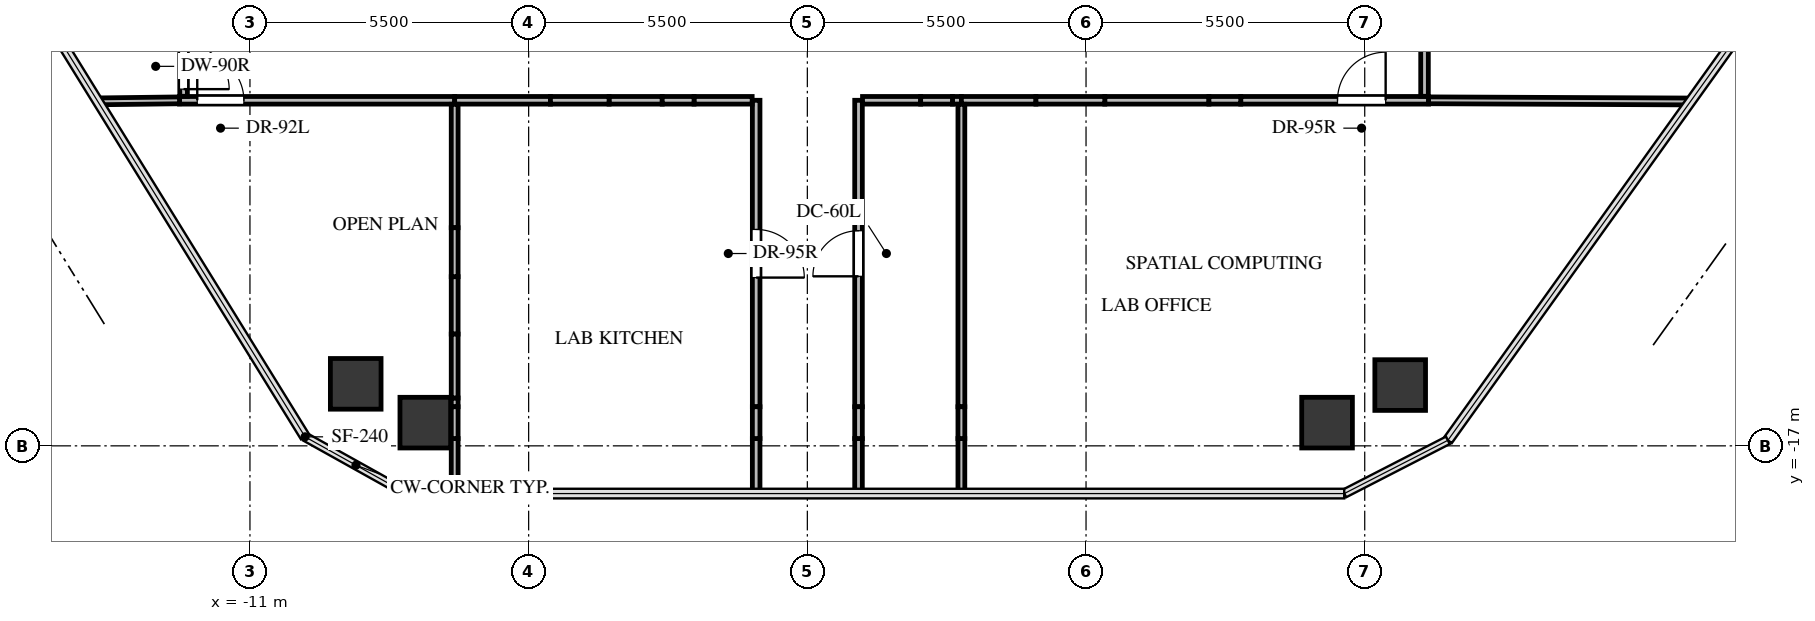
"""IFC4 building model, lengths in metres.
Left out: names, types, materials, properties, quantities, classifications, styles, units other than length and angle.
Written with IfcOpenShell. Run it as: python <this file> out.ifc"""

import sys

from ifc_helpers import new_model, si_unit, direction, frame, frame_2d, origin, origin_2d, place, context, subcontext, project, spatial, rectangle, extrude, source, transform, mapped, element, fill, save


model = new_model("IFC4")
c1 = context("Model", 3, precision=1e-05, world=origin(), true_north=direction((0.0, 1.0)))
c2 = subcontext(c1, "Body", "Model", "MODEL_VIEW")
j1 = project(units=[si_unit("LENGTHUNIT", "METRE"), si_unit("PLANEANGLEUNIT", "RADIAN")], contexts=[c1])
p1 = place(None, origin())
s1 = spatial("IfcSite", under=j1, at=p1, CompositionType="ELEMENT")
p2 = place(p1, origin())
s2 = spatial("IfcBuilding", under=s1, at=p2, CompositionType="ELEMENT")
p3 = place(p2, frame((0.0, 0.0, 159.3)))
s3 = spatial("IfcBuildingStorey", under=s2, at=p3, CompositionType="ELEMENT", Elevation=159.3)
m1 = source(origin(), c2, "Body", "SweptSolid", [
    extrude(rectangle(XDim=1.0, YDim=1.0, at=origin_2d()), origin(), (0.0, 0.0, 1.0), 3.22),
])
for number, where, z_axis, x_axis in (
    (1, (-8.913, -15.776, -0.24), (0.0, 0.0, 1.0), (1.0, 0.0, 0.0)),
    (2, (11.7, -15.8, -0.24), (0.0, 0.0, 1.0), (1.0, 0.0, 0.0)),
    (3, (10.257, -16.542, -0.24), (0.0, 0.0, 1.0), (1.0, 0.0, 0.0)),
    (4, (-7.54, -16.542, -0.24), (0.0, 0.0, 1.0), (1.0, 0.0, 0.0)),
):
    element("IfcColumn", number, at=place(p3, frame(where, z_axis=z_axis, x_axis=x_axis)), inside=s3, PredefinedType="COLUMN", context=c2, shape_type="MappedRepresentation", body=[
        mapped(m1, transform((0.0, 0.0, 0.0), x_axis=(1.0, 0.0, 0.0), y_axis=(0.0, 1.0, 0.0), z_axis=(0.0, 0.0, 1.0), scale=1.0)),
    ])
p4 = place(p3, frame((-12.39, -10.18, 0.0), z_axis=(0.0, 0.0, 1.0), x_axis=(1.0, 0.0, 0.0)))
e5 = element("IfcWall", 5, at=p4, inside=s3, PredefinedType="PARTITIONING", context=c2, shape_type="SweptSolid", body=[
    extrude(rectangle(XDim=5.43, YDim=0.15, at=frame_2d((2.715, 0.0))), origin(), (0.0, 0.0, 1.0), 2.319),
])
p5 = place(p4, frame((0.35, 0.0, 0.0)))
e6 = element("IfcOpeningElement", 6, at=p5, cuts=e5, PredefinedType="OPENING", context=c2, shape_type="SweptSolid", body=[
    extrude(rectangle(XDim=0.92, YDim=2.1, at=frame_2d((0.46, 1.05))), frame((0.0, 0.085, 0.0), z_axis=(0.0, -1.0, 0.0), x_axis=(1.0, 0.0, 0.0)), (0.0, 0.0, 1.0), 0.17),
])
p6 = place(p3, frame((-1.01, -10.18, 0.0), z_axis=(0.0, 0.0, 1.0), x_axis=(0.0, -1.0, 0.0)))
e7 = element("IfcWall", 7, at=p6, inside=s3, PredefinedType="PARTITIONING", context=c2, shape_type="SweptSolid", body=[
    extrude(rectangle(XDim=6.048, YDim=0.15, at=frame_2d((3.024, 0.0))), origin(), (0.0, 0.0, 1.0), 2.965),
])
p7 = place(p6, frame((2.549, 0.0, 0.0)))
e8 = element("IfcOpeningElement", 8, at=p7, cuts=e7, PredefinedType="OPENING", context=c2, shape_type="SweptSolid", body=[
    extrude(rectangle(XDim=0.95, YDim=2.1, at=frame_2d((0.475, 1.05))), frame((0.0, 0.085, 0.0), z_axis=(0.0, -1.0, 0.0), x_axis=(1.0, 0.0, 0.0)), (0.0, 0.0, 1.0), 0.17),
])
p8 = place(p3, frame((-1.01, -16.856, 0.0), z_axis=(0.0, 0.0, 1.0), x_axis=(0.0, -1.0, 0.0)))
e9 = element("IfcWall", 9, at=p8, inside=s3, PredefinedType="PARTITIONING", context=c2, shape_type="SweptSolid", body=[
    extrude(rectangle(XDim=1.086, YDim=0.15, at=frame_2d((0.543, 0.0))), origin(), (0.0, 0.0, 1.0), 2.965),
])
p9 = place(p3, frame((-1.01, -16.228, 0.0), z_axis=(0.0, 0.0, 1.0), x_axis=(0.0, -1.0, 0.0)))
e10 = element("IfcWall", 10, at=p9, inside=s3, PredefinedType="PARTITIONING", context=c2, shape_type="SweptSolid", body=[
    extrude(rectangle(XDim=0.627, YDim=0.15, at=frame_2d((0.314, 0.0))), origin(), (0.0, 0.0, 1.0), 1.904),
])
p10 = place(p3, frame((-6.96, -10.18, 0.0), z_axis=(0.0, 0.0, 1.0), x_axis=(1.0, 0.0, 0.0)))
e11 = element("IfcWall", 11, at=p10, inside=s3, PredefinedType="PARTITIONING", context=c2, shape_type="SweptSolid", body=[
    extrude(rectangle(XDim=1.89, YDim=0.15, at=frame_2d((0.945, 0.0))), origin(), (0.0, 0.0, 1.0), 2.965),
])
p11 = place(p3, frame((-3.913, -10.18, 0.0), z_axis=(0.0, 0.0, 1.0), x_axis=(1.0, 0.0, 0.0)))
e12 = element("IfcWall", 12, at=p11, inside=s3, PredefinedType="PARTITIONING", context=c2, shape_type="SweptSolid", body=[
    extrude(rectangle(XDim=1.049, YDim=0.15, at=frame_2d((0.524, 0.0))), origin(), (0.0, 0.0, 1.0), 2.965),
])
p12 = place(p3, frame((-2.236, -10.18, 0.0), z_axis=(0.0, 0.0, 1.0), x_axis=(1.0, 0.0, 0.0)))
e13 = element("IfcWall", 13, at=p12, inside=s3, PredefinedType="PARTITIONING", context=c2, shape_type="SweptSolid", body=[
    extrude(rectangle(XDim=1.147, YDim=0.15, at=frame_2d((0.573, 0.0))), origin(), (0.0, 0.0, 1.0), 2.965),
])
p13 = place(p3, frame((-5.07, -10.18, 0.0), z_axis=(0.0, 0.0, 1.0), x_axis=(1.0, 0.0, 0.0)))
e14 = element("IfcWall", 14, at=p13, inside=s3, PredefinedType="PARTITIONING", context=c2, shape_type="SweptSolid", body=[
    extrude(rectangle(XDim=1.157, YDim=0.15, at=frame_2d((0.579, 0.0))), origin(), (0.0, 0.0, 1.0), 1.904),
])
p14 = place(p3, frame((-2.864, -10.18, 0.0), z_axis=(0.0, 0.0, 1.0), x_axis=(1.0, 0.0, 0.0)))
e15 = element("IfcWall", 15, at=p14, inside=s3, PredefinedType="PARTITIONING", context=c2, shape_type="SweptSolid", body=[
    extrude(rectangle(XDim=0.628, YDim=0.15, at=frame_2d((0.314, 0.0))), origin(), (0.0, 0.0, 1.0), 1.904),
])
p15 = place(p3, frame((1.01, -17.942, 0.0), z_axis=(0.0, 0.0, 1.0), x_axis=(0.0, 1.0, 0.0)))
e16 = element("IfcWall", 16, at=p15, inside=s3, PredefinedType="PARTITIONING", context=c2, shape_type="SweptSolid", body=[
    extrude(rectangle(XDim=1.086, YDim=0.15, at=frame_2d((0.543, 0.0))), origin(), (0.0, 0.0, 1.0), 2.965),
])
p16 = place(p3, frame((1.01, -16.228, 0.0), z_axis=(0.0, 0.0, 1.0), x_axis=(0.0, 1.0, 0.0)))
e17 = element("IfcWall", 17, at=p16, inside=s3, PredefinedType="PARTITIONING", context=c2, shape_type="SweptSolid", body=[
    extrude(rectangle(XDim=6.048, YDim=0.15, at=frame_2d((3.024, 0.0))), origin(), (0.0, 0.0, 1.0), 2.965),
])
p17 = place(p16, frame((2.574, 0.0, 0.0)))
e18 = element("IfcOpeningElement", 18, at=p17, cuts=e17, PredefinedType="OPENING", context=c2, shape_type="SweptSolid", body=[
    extrude(rectangle(XDim=0.9, YDim=2.05, at=frame_2d((0.45, 1.025))), frame((0.0, 0.085, 0.0), z_axis=(0.0, -1.0, 0.0), x_axis=(1.0, 0.0, 0.0)), (0.0, 0.0, 1.0), 0.17),
])
p18 = place(p3, frame((1.01, -16.856, 0.0), z_axis=(0.0, 0.0, 1.0), x_axis=(0.0, 1.0, 0.0)))
e19 = element("IfcWall", 19, at=p18, inside=s3, PredefinedType="PARTITIONING", context=c2, shape_type="SweptSolid", body=[
    extrude(rectangle(XDim=0.627, YDim=0.15, at=frame_2d((0.314, 0.0))), origin(), (0.0, 0.0, 1.0), 1.904),
])
p19 = place(p3, frame((1.089, -10.18, 0.0), z_axis=(0.0, 0.0, 1.0), x_axis=(1.0, 0.0, 0.0)))
e20 = element("IfcWall", 20, at=p19, inside=s3, PredefinedType="PARTITIONING", context=c2, shape_type="SweptSolid", body=[
    extrude(rectangle(XDim=1.147, YDim=0.15, at=frame_2d((0.573, 0.0))), origin(), (0.0, 0.0, 1.0), 2.965),
])
p20 = place(p3, frame((2.864, -10.18, 0.0), z_axis=(0.0, 0.0, 1.0), x_axis=(1.0, 0.0, 0.0)))
e21 = element("IfcWall", 21, at=p20, inside=s3, PredefinedType="PARTITIONING", context=c2, shape_type="SweptSolid", body=[
    extrude(rectangle(XDim=0.176, YDim=0.15, at=frame_2d((0.088, 0.0))), origin(), (0.0, 0.0, 1.0), 2.965),
])
p21 = place(p3, frame((2.236, -10.18, 0.0), z_axis=(0.0, 0.0, 1.0), x_axis=(1.0, 0.0, 0.0)))
e22 = element("IfcWall", 22, at=p21, inside=s3, PredefinedType="PARTITIONING", context=c2, shape_type="SweptSolid", body=[
    extrude(rectangle(XDim=0.628, YDim=0.15, at=frame_2d((0.314, 0.0))), origin(), (0.0, 0.0, 1.0), 1.904),
])
p22 = place(p3, frame((3.04, -10.18, 0.0), z_axis=(0.0, 0.0, 1.0), x_axis=(1.0, 0.0, 0.0)))
e23 = element("IfcWall", 23, at=p22, inside=s3, PredefinedType="PARTITIONING", context=c2, shape_type="SweptSolid", body=[
    extrude(rectangle(XDim=1.471, YDim=0.15, at=frame_2d((0.736, 0.0))), origin(), (0.0, 0.0, 1.0), 2.162),
])
p23 = place(p3, frame((5.87, -10.18, 0.0), z_axis=(0.0, 0.0, 1.0), x_axis=(1.0, 0.0, 0.0)))
e24 = element("IfcWall", 24, at=p23, inside=s3, PredefinedType="PARTITIONING", context=c2, shape_type="SweptSolid", body=[
    extrude(rectangle(XDim=2.056, YDim=0.15, at=frame_2d((1.028, 0.0))), origin(), (0.0, 0.0, 1.0), 2.162),
])
p24 = place(p3, frame((8.553, -10.18, 0.0), z_axis=(0.0, 0.0, 1.0), x_axis=(1.0, 0.0, 0.0)))
e25 = element("IfcWall", 25, at=p24, inside=s3, PredefinedType="PARTITIONING", context=c2, shape_type="SweptSolid", body=[
    extrude(rectangle(XDim=3.707, YDim=0.15, at=frame_2d((1.854, 0.0))), origin(), (0.0, 0.0, 1.0), 2.965),
])
p25 = place(p24, frame((1.91, 0.0, 0.0)))
e26 = element("IfcOpeningElement", 26, at=p25, cuts=e25, PredefinedType="OPENING", context=c2, shape_type="SweptSolid", body=[
    extrude(rectangle(XDim=0.95, YDim=2.1, at=frame_2d((0.475, 1.05))), frame((0.0, 0.085, 0.0), z_axis=(0.0, -1.0, 0.0), x_axis=(1.0, 0.0, 0.0)), (0.0, 0.0, 1.0), 0.17),
])
p26 = place(p3, frame((4.511, -10.18, 0.0), z_axis=(0.0, 0.0, 1.0), x_axis=(1.0, 0.0, 0.0)))
e27 = element("IfcWall", 27, at=p26, inside=s3, PredefinedType="PARTITIONING", context=c2, shape_type="SweptSolid", body=[
    extrude(rectangle(XDim=1.358, YDim=0.15, at=frame_2d((0.679, 0.0))), origin(), (0.0, 0.0, 1.0), 2.162),
])
p27 = place(p3, frame((7.925, -10.18, 0.0), z_axis=(0.0, 0.0, 1.0), x_axis=(1.0, 0.0, 0.0)))
e28 = element("IfcWall", 28, at=p27, inside=s3, PredefinedType="PARTITIONING", context=c2, shape_type="SweptSolid", body=[
    extrude(rectangle(XDim=0.627, YDim=0.15, at=frame_2d((0.314, 0.0))), origin(), (0.0, 0.0, 1.0), 1.904),
])
p28 = place(p3, frame((-12.31, -8.919, 0.0), z_axis=(0.0, 0.0, 1.0), x_axis=(0.0, -1.0, 0.0)))
e29 = element("IfcWall", 29, at=p28, inside=s3, PredefinedType="PARTITIONING", context=c2, shape_type="SweptSolid", body=[
    extrude(rectangle(XDim=1.182, YDim=0.15, at=frame_2d((0.591, 0.0))), origin(), (0.0, 0.0, 1.0), 2.319),
])
p29 = place(p28, frame((0.141, 0.0, 0.0)))
e30 = element("IfcOpeningElement", 30, at=p29, cuts=e29, PredefinedType="OPENING", context=c2, shape_type="SweptSolid", body=[
    extrude(rectangle(XDim=0.9, YDim=2.05, at=frame_2d((0.45, 1.025))), frame((0.0, 0.085, 0.0), z_axis=(0.0, -1.0, 0.0), x_axis=(1.0, 0.0, 0.0)), (0.0, 0.0, 1.0), 0.17),
])
p30 = place(p3, frame((12.18, -10.101, 0.0), z_axis=(0.0, 0.0, 1.0), x_axis=(0.0, 1.0, 0.0)))
e31 = element("IfcWall", 31, at=p30, inside=s3, PredefinedType="PARTITIONING", context=c2, shape_type="SweptSolid", body=[
    extrude(rectangle(XDim=1.661, YDim=0.15, at=frame_2d((0.831, 0.0))), origin(), (0.0, 0.0, 1.0), 2.965),
])
p31 = place(p3, frame((-6.96, -10.259, 0.0), z_axis=(0.0, 0.0, 1.0), x_axis=(0.0, -1.0, 0.0)))
e32 = element("IfcWall", 32, at=p31, inside=s3, PredefinedType="PARTITIONING", context=c2, shape_type="SweptSolid", body=[
    extrude(rectangle(XDim=2.436, YDim=0.135, at=frame_2d((1.218, 0.0))), origin(), (0.0, 0.0, 1.0), 2.162),
])
p32 = place(p3, frame((-6.96, -13.661, 0.0), z_axis=(0.0, 0.0, 1.0), x_axis=(0.0, -1.0, 0.0)))
e33 = element("IfcWall", 33, at=p32, inside=s3, PredefinedType="PARTITIONING", context=c2, shape_type="SweptSolid", body=[
    extrude(rectangle(XDim=1.133, YDim=0.135, at=frame_2d((0.566, 0.0))), origin(), (0.0, 0.0, 1.0), 2.162),
])
p33 = place(p3, frame((-6.96, -16.055, 0.0), z_axis=(0.0, 0.0, 1.0), x_axis=(0.0, -1.0, 0.0)))
e34 = element("IfcWall", 34, at=p33, inside=s3, PredefinedType="PARTITIONING", context=c2, shape_type="SweptSolid", body=[
    extrude(rectangle(XDim=0.173, YDim=0.135, at=frame_2d((0.086, 0.0))), origin(), (0.0, 0.0, 1.0), 2.162),
])
p34 = place(p3, frame((-6.96, -16.856, 0.0), z_axis=(0.0, 0.0, 1.0), x_axis=(0.0, -1.0, 0.0)))
e35 = element("IfcWall", 35, at=p34, inside=s3, PredefinedType="PARTITIONING", context=c2, shape_type="SweptSolid", body=[
    extrude(rectangle(XDim=1.086, YDim=0.135, at=frame_2d((0.543, 0.0))), origin(), (0.0, 0.0, 1.0), 2.965),
])
p35 = place(p3, frame((-6.96, -12.695, 0.0), z_axis=(0.0, 0.0, 1.0), x_axis=(0.0, -1.0, 0.0)))
e36 = element("IfcWall", 36, at=p35, inside=s3, PredefinedType="PARTITIONING", context=c2, shape_type="SweptSolid", body=[
    extrude(rectangle(XDim=0.966, YDim=0.135, at=frame_2d((0.483, 0.0))), origin(), (0.0, 0.0, 1.0), 2.162),
])
p36 = place(p3, frame((-6.96, -14.794, 0.0), z_axis=(0.0, 0.0, 1.0), x_axis=(0.0, -1.0, 0.0)))
e37 = element("IfcWall", 37, at=p36, inside=s3, PredefinedType="PARTITIONING", context=c2, shape_type="SweptSolid", body=[
    extrude(rectangle(XDim=1.261, YDim=0.135, at=frame_2d((0.63, 0.0))), origin(), (0.0, 0.0, 1.0), 2.162),
])
p37 = place(p3, frame((-6.96, -16.228, 0.0), z_axis=(0.0, 0.0, 1.0), x_axis=(0.0, -1.0, 0.0)))
e38 = element("IfcWall", 38, at=p37, inside=s3, PredefinedType="PARTITIONING", context=c2, shape_type="SweptSolid", body=[
    extrude(rectangle(XDim=0.627, YDim=0.135, at=frame_2d((0.314, 0.0))), origin(), (0.0, 0.0, 1.0), 1.904),
])
p38 = place(p3, frame((-14.004, -10.201, 0.0), z_axis=(0.0, 0.0, 1.0), x_axis=(0.999923084603, 0.012402615782, 0.0)))
e39 = element("IfcWall", 39, at=p38, inside=s3, PredefinedType="PARTITIONING", context=c2, shape_type="SweptSolid", body=[
    extrude(rectangle(XDim=1.614, YDim=0.135, at=frame_2d((0.807, 0.0))), origin(), (0.0, 0.0, 1.0), 2.319),
])
p39 = place(p3, frame((3.04, -10.259, 0.0), z_axis=(0.0, 0.0, 1.0), x_axis=(0.0, -1.0, 0.0)))
e40 = element("IfcWall", 40, at=p39, inside=s3, PredefinedType="PARTITIONING", context=c2, shape_type="SweptSolid", body=[
    extrude(rectangle(XDim=5.969, YDim=0.135, at=frame_2d((2.985, 0.0))), origin(), (0.0, 0.0, 1.0), 2.965),
])
p40 = place(p3, frame((3.04, -16.856, 0.0), z_axis=(0.0, 0.0, 1.0), x_axis=(0.0, -1.0, 0.0)))
e41 = element("IfcWall", 41, at=p40, inside=s3, PredefinedType="PARTITIONING", context=c2, shape_type="SweptSolid", body=[
    extrude(rectangle(XDim=1.086, YDim=0.135, at=frame_2d((0.543, 0.0))), origin(), (0.0, 0.0, 1.0), 2.965),
])
p41 = place(p3, frame((3.04, -16.228, 0.0), z_axis=(0.0, 0.0, 1.0), x_axis=(0.0, -1.0, 0.0)))
e42 = element("IfcWall", 42, at=p41, inside=s3, PredefinedType="PARTITIONING", context=c2, shape_type="SweptSolid", body=[
    extrude(rectangle(XDim=0.627, YDim=0.135, at=frame_2d((0.314, 0.0))), origin(), (0.0, 0.0, 1.0), 1.904),
])
p42 = place(p3, frame((12.26, -10.18, 0.0), z_axis=(0.0, 0.0, 1.0), x_axis=(0.999990144117, -0.004439782427, 0.0)))
e43 = element("IfcWall", 43, at=p42, inside=s3, PredefinedType="PARTITIONING", context=c2, shape_type="SweptSolid", body=[
    extrude(rectangle(XDim=5.169, YDim=0.135, at=frame_2d((2.584, 0.0))), origin(), (0.0, 0.0, 1.0), 2.319),
])
m2 = source(origin(), c2, "Body", "SweptSolid", [
    extrude(rectangle(XDim=0.92, YDim=2.1, at=frame_2d((0.46, 1.05))), frame((0.0, 0.025, 0.0), z_axis=(0.0, -1.0, 0.0), x_axis=(1.0, 0.0, 0.0)), (0.0, 0.0, 1.0), 0.05),
])
p43 = place(p5, origin())
e44 = element("IfcDoor", 44, at=p43, inside=s3, OperationType="SINGLE_SWING_LEFT", PredefinedType="DOOR", context=c2, shape_type="MappedRepresentation", body=[
    mapped(m2, transform((0.0, 0.0, 0.0), x_axis=(1.0, 0.0, 0.0), y_axis=(0.0, 1.0, 0.0), z_axis=(0.0, 0.0, 1.0), scale=1.0)),
])
fill(e6, e44)
m3 = source(origin(), c2, "Body", "SweptSolid", [
    extrude(rectangle(XDim=0.95, YDim=2.1, at=frame_2d((0.475, 1.05))), frame((0.0, 0.025, 0.0), z_axis=(0.0, -1.0, 0.0), x_axis=(1.0, 0.0, 0.0)), (0.0, 0.0, 1.0), 0.05),
])
p44 = place(p7, origin())
e45 = element("IfcDoor", 45, at=p44, inside=s3, OperationType="SINGLE_SWING_RIGHT", PredefinedType="DOOR", context=c2, shape_type="MappedRepresentation", body=[
    mapped(m3, transform((0.0, 0.0, 0.0), x_axis=(1.0, 0.0, 0.0), y_axis=(0.0, 1.0, 0.0), z_axis=(0.0, 0.0, 1.0), scale=1.0)),
])
fill(e8, e45)
m4 = source(origin(), c2, "Body", "SweptSolid", [
    extrude(rectangle(XDim=0.9, YDim=2.05, at=frame_2d((0.45, 1.025))), frame((0.0, 0.025, 0.0), z_axis=(0.0, -1.0, 0.0), x_axis=(1.0, 0.0, 0.0)), (0.0, 0.0, 1.0), 0.05),
])
p45 = place(p17, origin())
e46 = element("IfcDoor", 46, at=p45, inside=s3, OperationType="SINGLE_SWING_LEFT", PredefinedType="DOOR", context=c2, shape_type="MappedRepresentation", body=[
    mapped(m4, transform((0.0, 0.0, 0.0), x_axis=(1.0, 0.0, 0.0), y_axis=(0.0, 1.0, 0.0), z_axis=(0.0, 0.0, 1.0), scale=1.0)),
])
fill(e18, e46)
p46 = place(p25, origin())
e47 = element("IfcDoor", 47, at=p46, inside=s3, OperationType="SINGLE_SWING_RIGHT", PredefinedType="DOOR", context=c2, shape_type="MappedRepresentation", body=[
    mapped(m3, transform((0.0, 0.0, 0.0), x_axis=(1.0, 0.0, 0.0), y_axis=(0.0, 1.0, 0.0), z_axis=(0.0, 0.0, 1.0), scale=1.0)),
])
fill(e26, e47)
m5 = source(origin(), c2, "Body", "SweptSolid", [
    extrude(rectangle(XDim=0.9, YDim=2.05, at=frame_2d((0.45, 1.025))), frame((0.0, 0.025, 0.0), z_axis=(0.0, -1.0, 0.0), x_axis=(1.0, 0.0, 0.0)), (0.0, 0.0, 1.0), 0.05),
])
p47 = place(p29, origin())
e48 = element("IfcDoor", 48, at=p47, inside=s3, OperationType="SINGLE_SWING_RIGHT", PredefinedType="DOOR", context=c2, shape_type="MappedRepresentation", body=[
    mapped(m5, transform((0.0, 0.0, 0.0), x_axis=(1.0, 0.0, 0.0), y_axis=(0.0, 1.0, 0.0), z_axis=(0.0, 0.0, 1.0), scale=1.0)),
])
fill(e30, e48)
save(model, sys.argv[1])
